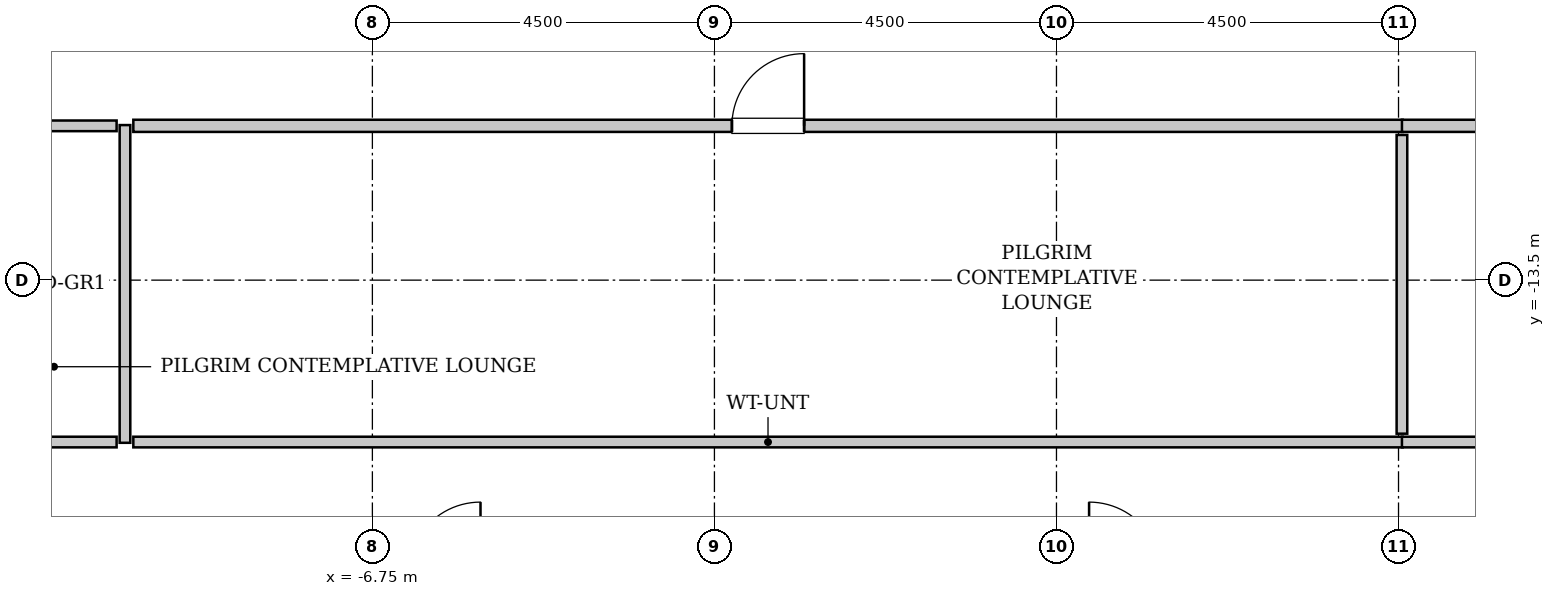
"""IFC4 building model, lengths in metres.
Left out: names, types, materials, properties, quantities, classifications, styles, units other than length and angle.
Written with IfcOpenShell. Run it as: python <this file> out.ifc"""

import sys

from ifc_helpers import new_model, si_unit, direction, frame, frame_2d, origin, place, context, subcontext, project, spatial, rectangle, extrude, source, transform, mapped, element, fill, save


model = new_model("IFC4")
c1 = context("Model", 3, precision=1e-05, world=origin(), true_north=direction((0.0, 1.0)))
c2 = subcontext(c1, "Body", "Model", "MODEL_VIEW")
j1 = project(units=[si_unit("LENGTHUNIT", "METRE"), si_unit("PLANEANGLEUNIT", "RADIAN")], contexts=[c1])
p1 = place(None, origin())
s1 = spatial("IfcSite", under=j1, at=p1, CompositionType="ELEMENT")
p2 = place(p1, origin())
s2 = spatial("IfcBuilding", under=s1, at=p2, CompositionType="ELEMENT")
p3 = place(p2, frame((0.0, 0.0, 252.2)))
s3 = spatial("IfcBuildingStorey", under=s2, at=p3, CompositionType="ELEMENT", Elevation=252.2)
m1 = source(origin(), c2, "Body", "SweptSolid", [
    extrude(rectangle(XDim=4.18, YDim=0.14, at=frame_2d((2.09, 0.0))), origin(), (0.0, 0.0, 1.0), 3.535),
])
p4 = place(p3, frame((-10.005, -15.64, 0.0), z_axis=(0.0, 0.0, 1.0), x_axis=(0.0, 1.0, 0.0)))
e1 = element("IfcWall", 1, at=p4, inside=s3, PredefinedType="PARTITIONING", context=c2, shape_type="MappedRepresentation", body=[
    mapped(m1, transform((0.0, 0.0, 0.0), x_axis=(1.0, 0.0, 0.0), y_axis=(0.0, 1.0, 0.0), z_axis=(0.0, 0.0, 1.0), scale=1.0)),
])
m2 = source(origin(), c2, "Body", "SweptSolid", [
    extrude(rectangle(XDim=1.765, YDim=0.14, at=frame_2d((0.882, 0.0))), origin(), (0.0, 0.0, 1.0), 3.535),
])
for number, where, z_axis, x_axis in (
    (2, (-11.88, -11.47, 0.0), (0.0, 0.0, 1.0), (1.0, 0.0, 0.0)),
    (3, (-11.88, -15.63, 0.0), (0.0, 0.0, 1.0), (1.0, 0.0, 0.0)),
):
    element("IfcWall", number, at=place(p3, frame(where, z_axis=z_axis, x_axis=x_axis)), inside=s3, PredefinedType="PARTITIONING", context=c2, shape_type="MappedRepresentation", body=[
        mapped(m2, transform((0.0, 0.0, 0.0), x_axis=(1.0, 0.0, 0.0), y_axis=(0.0, 1.0, 0.0), z_axis=(0.0, 0.0, 1.0), scale=1.0)),
    ])
m3 = source(origin(), c2, "Body", "SweptSolid", [
    extrude(rectangle(XDim=16.7, YDim=0.16, at=frame_2d((8.35, 0.0))), origin(), (0.0, 0.0, 1.0), 3.535),
])
p5 = place(p3, frame((-9.895, -11.47, 0.0), z_axis=(0.0, 0.0, 1.0), x_axis=(1.0, 0.0, 0.0)))
e4 = element("IfcWall", 4, at=p5, inside=s3, PredefinedType="PARTITIONING", context=c2, shape_type="MappedRepresentation", body=[
    mapped(m3, transform((0.0, 0.0, 0.0), x_axis=(1.0, 0.0, 0.0), y_axis=(0.0, 1.0, 0.0), z_axis=(0.0, 0.0, 1.0), scale=1.0)),
])
p6 = place(p5, frame((7.875, 0.0, 0.0)))
e5 = element("IfcOpeningElement", 5, at=p6, cuts=e4, PredefinedType="OPENING", context=c2, shape_type="SweptSolid", body=[
    extrude(rectangle(XDim=0.95, YDim=2.1, at=frame_2d((0.475, 1.05))), frame((0.0, 0.09, 0.0), z_axis=(0.0, -1.0, 0.0), x_axis=(1.0, 0.0, 0.0)), (0.0, 0.0, 1.0), 0.18),
])
m4 = source(origin(), c2, "Body", "SweptSolid", [
    extrude(rectangle(XDim=16.7, YDim=0.14, at=frame_2d((8.35, 0.0))), origin(), (0.0, 0.0, 1.0), 3.535),
])
p7 = place(p3, frame((-9.895, -15.63, 0.0), z_axis=(0.0, 0.0, 1.0), x_axis=(1.0, 0.0, 0.0)))
e6 = element("IfcWall", 6, at=p7, inside=s3, PredefinedType="PARTITIONING", context=c2, shape_type="MappedRepresentation", body=[
    mapped(m4, transform((0.0, 0.0, 0.0), x_axis=(1.0, 0.0, 0.0), y_axis=(0.0, 1.0, 0.0), z_axis=(0.0, 0.0, 1.0), scale=1.0)),
])
m5 = source(origin(), c2, "Body", "SweptSolid", [
    extrude(rectangle(XDim=3.93, YDim=0.14, at=frame_2d((1.965, 0.0))), origin(), (0.0, 0.0, 1.0), 3.535),
])
p8 = place(p3, frame((6.795, -15.52, 0.0), z_axis=(0.0, 0.0, 1.0), x_axis=(0.0, 1.0, 0.0)))
e7 = element("IfcWall", 7, at=p8, inside=s3, PredefinedType="PARTITIONING", context=c2, shape_type="MappedRepresentation", body=[
    mapped(m5, transform((0.0, 0.0, 0.0), x_axis=(1.0, 0.0, 0.0), y_axis=(0.0, 1.0, 0.0), z_axis=(0.0, 0.0, 1.0), scale=1.0)),
])
m6 = source(origin(), c2, "Body", "SweptSolid", [
    extrude(rectangle(XDim=5.215, YDim=0.16, at=frame_2d((2.607, 0.0))), origin(), (0.0, 0.0, 1.0), 3.535),
])
p9 = place(p3, frame((6.795, -11.47, 0.0), z_axis=(0.0, 0.0, 1.0), x_axis=(1.0, 0.0, 0.0)))
e8 = element("IfcWall", 8, at=p9, inside=s3, PredefinedType="PARTITIONING", context=c2, shape_type="MappedRepresentation", body=[
    mapped(m6, transform((0.0, 0.0, 0.0), x_axis=(1.0, 0.0, 0.0), y_axis=(0.0, 1.0, 0.0), z_axis=(0.0, 0.0, 1.0), scale=1.0)),
])
p10 = place(p9, frame((2.133, 0.0, 0.0)))
e9 = element("IfcOpeningElement", 9, at=p10, cuts=e8, PredefinedType="OPENING", context=c2, shape_type="SweptSolid", body=[
    extrude(rectangle(XDim=0.95, YDim=2.1, at=frame_2d((0.475, 1.05))), frame((0.0, 0.09, 0.0), z_axis=(0.0, -1.0, 0.0), x_axis=(1.0, 0.0, 0.0)), (0.0, 0.0, 1.0), 0.18),
])
m7 = source(origin(), c2, "Body", "SweptSolid", [
    extrude(rectangle(XDim=5.215, YDim=0.14, at=frame_2d((2.607, 0.0))), origin(), (0.0, 0.0, 1.0), 3.535),
])
p11 = place(p3, frame((6.795, -15.63, 0.0), z_axis=(0.0, 0.0, 1.0), x_axis=(1.0, 0.0, 0.0)))
e10 = element("IfcWall", 10, at=p11, inside=s3, PredefinedType="PARTITIONING", context=c2, shape_type="MappedRepresentation", body=[
    mapped(m7, transform((0.0, 0.0, 0.0), x_axis=(1.0, 0.0, 0.0), y_axis=(0.0, 1.0, 0.0), z_axis=(0.0, 0.0, 1.0), scale=1.0)),
])
m8 = source(origin(), c2, "Body", "SweptSolid", [
    extrude(rectangle(XDim=0.95, YDim=2.1, at=frame_2d((0.475, 1.05))), frame((0.0, 0.025, 0.0), z_axis=(0.0, -1.0, 0.0), x_axis=(1.0, 0.0, 0.0)), (0.0, 0.0, 1.0), 0.05),
])
p12 = place(p6, origin())
e11 = element("IfcDoor", 11, at=p12, inside=s3, OperationType="SINGLE_SWING_RIGHT", PredefinedType="DOOR", context=c2, shape_type="MappedRepresentation", body=[
    mapped(m8, transform((0.0, 0.0, 0.0), x_axis=(1.0, 0.0, 0.0), y_axis=(0.0, 1.0, 0.0), z_axis=(0.0, 0.0, 1.0), scale=1.0)),
])
fill(e5, e11)
save(model, sys.argv[1])
